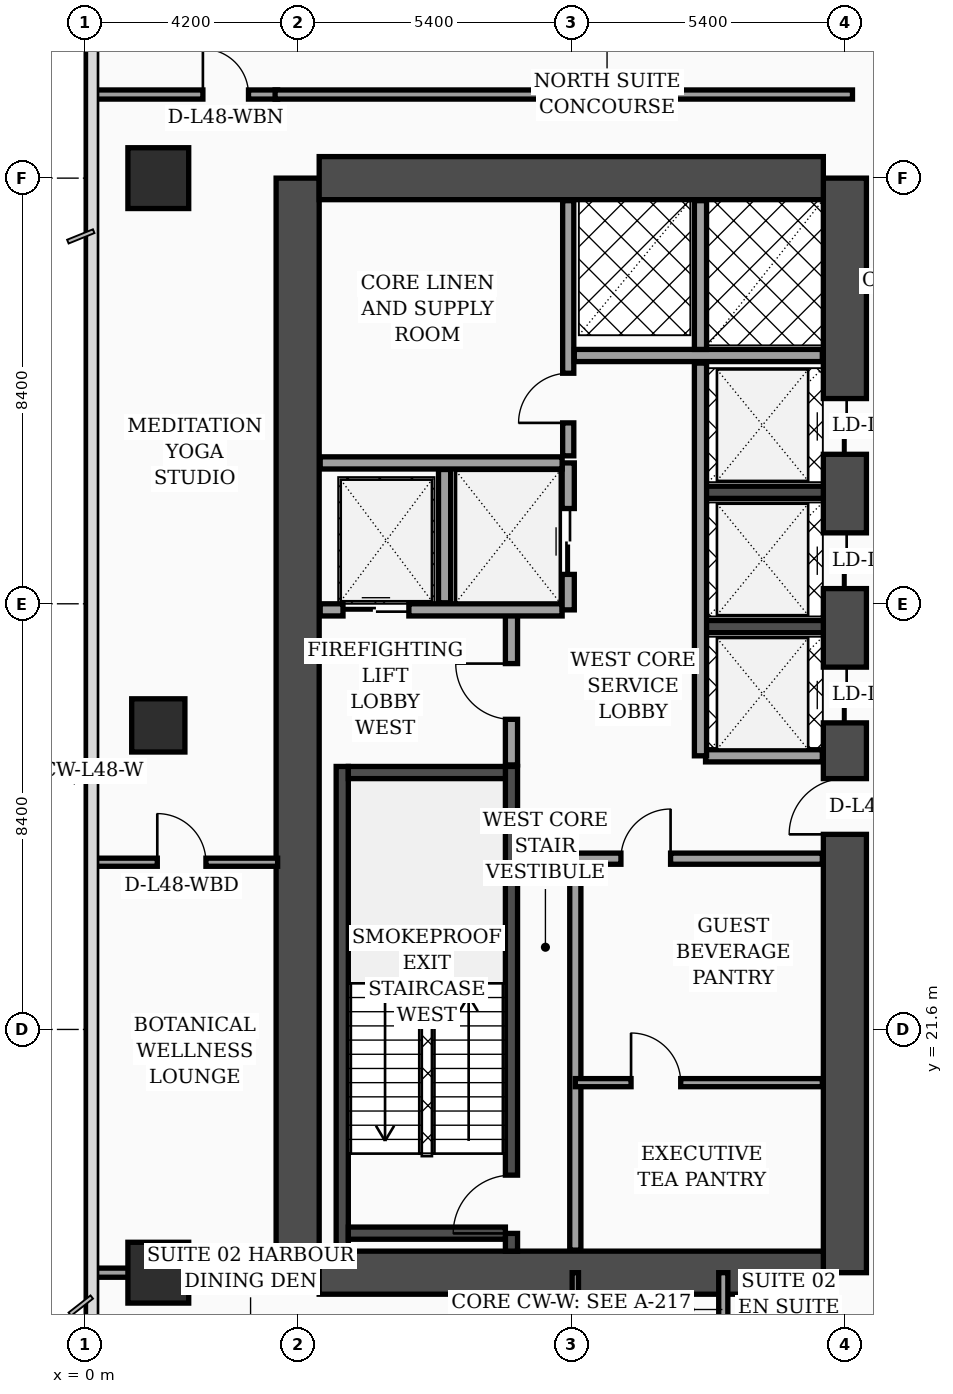
"""IFC4 building model, lengths in metres.
Left out: names, types, materials, properties, quantities, classifications, styles, units other than length and angle.
Written with IfcOpenShell. Run it as: python <this file> out.ifc"""

import sys

from ifc_helpers import new_model, si_unit, direction, frame, frame_2d, origin, origin_2d, place, context, subcontext, project, spatial, rectangle, extrude, element, fill, save


model = new_model("IFC4")
c1 = context("Model", 3, precision=1e-05, world=origin(), true_north=direction((0.0, 1.0)))
c2 = subcontext(c1, "Body", "Model", "MODEL_VIEW")
j1 = project(units=[si_unit("LENGTHUNIT", "METRE"), si_unit("PLANEANGLEUNIT", "RADIAN")], contexts=[c1])
p1 = place(None, origin())
s1 = spatial("IfcSite", under=j1, at=p1, CompositionType="ELEMENT")
p2 = place(p1, origin())
s2 = spatial("IfcBuilding", under=s1, at=p2, CompositionType="ELEMENT")
p3 = place(p2, frame((0.0, 0.0, 195.1)))
s3 = spatial("IfcBuildingStorey", under=s2, at=p3, CompositionType="ELEMENT", Elevation=195.1)
p4 = place(p3, frame((4.2, 16.8, 0.0), z_axis=(0.0, 0.0, 1.0), x_axis=(0.0, 1.0, 0.0)))
e1 = element("IfcWall", 1, at=p4, inside=s3, PredefinedType="SHEAR", context=c2, shape_type="SweptSolid", body=[
    extrude(rectangle(XDim=21.6, YDim=0.85, at=frame_2d((10.8, 0.0))), origin(), (0.0, 0.0, 1.0), 4.05),
])
p5 = place(p3, frame((15.0, 16.8, 0.0), z_axis=(0.0, 0.0, 1.0), x_axis=(0.0, 1.0, 0.0)))
e2 = element("IfcWall", 2, at=p5, inside=s3, PredefinedType="SHEAR", context=c2, shape_type="SweptSolid", body=[
    extrude(rectangle(XDim=21.6, YDim=0.85, at=frame_2d((10.8, 0.0))), origin(), (0.0, 0.0, 1.0), 4.05),
])
p6 = place(p5, frame((8.65, 0.0, 0.0)))
e3 = element("IfcOpeningElement", 3, at=p6, cuts=e2, PredefinedType="OPENING", context=c2, shape_type="SweptSolid", body=[
    extrude(rectangle(XDim=1.1, YDim=2.2, at=frame_2d((0.55, 1.1))), frame((0.0, 0.435, 0.0), z_axis=(0.0, -1.0, 0.0), x_axis=(1.0, 0.0, 0.0)), (0.0, 0.0, 1.0), 0.87),
])
p7 = place(p5, frame((10.85, 0.0, 0.0)))
e4 = element("IfcOpeningElement", 4, at=p7, cuts=e2, PredefinedType="OPENING", context=c2, shape_type="SweptSolid", body=[
    extrude(rectangle(XDim=1.1, YDim=2.2, at=frame_2d((0.55, 1.1))), frame((0.0, 0.435, 0.0), z_axis=(0.0, -1.0, 0.0), x_axis=(1.0, 0.0, 0.0)), (0.0, 0.0, 1.0), 0.87),
])
p8 = place(p5, frame((13.5, 0.0, 0.0)))
e5 = element("IfcOpeningElement", 5, at=p8, cuts=e2, PredefinedType="OPENING", context=c2, shape_type="SweptSolid", body=[
    extrude(rectangle(XDim=1.1, YDim=2.2, at=frame_2d((0.55, 1.1))), frame((0.0, 0.435, 0.0), z_axis=(0.0, -1.0, 0.0), x_axis=(1.0, 0.0, 0.0)), (0.0, 0.0, 1.0), 0.87),
])
p9 = place(p5, frame((16.15, 0.0, 0.0)))
e6 = element("IfcOpeningElement", 6, at=p9, cuts=e2, PredefinedType="OPENING", context=c2, shape_type="SweptSolid", body=[
    extrude(rectangle(XDim=1.1, YDim=2.2, at=frame_2d((0.55, 1.1))), frame((0.0, 0.435, 0.0), z_axis=(0.0, -1.0, 0.0), x_axis=(1.0, 0.0, 0.0)), (0.0, 0.0, 1.0), 0.87),
])
for number, where, z_axis, x_axis in (
    (7, (4.625, 38.4, 0.0), (0.0, 0.0, 1.0), (1.0, 0.0, 0.0)),
    (8, (4.625, 16.8, 0.0), (0.0, 0.0, 1.0), (1.0, 0.0, 0.0)),
):
    element("IfcWall", number, at=place(p3, frame(where, z_axis=z_axis, x_axis=x_axis)), inside=s3, PredefinedType="SHEAR", context=c2, shape_type="SweptSolid", body=[
        extrude(rectangle(XDim=9.95, YDim=0.85, at=frame_2d((4.975, 0.0))), origin(), (0.0, 0.0, 1.0), 4.05),
    ])
p10 = place(p3, frame((5.08, 17.225, 0.0), z_axis=(0.0, 0.0, 1.0), x_axis=(0.0, 1.0, 0.0)))
e9 = element("IfcWall", 9, at=p10, inside=s3, PredefinedType="SOLIDWALL", context=c2, shape_type="SweptSolid", body=[
    extrude(rectangle(XDim=9.565, YDim=0.24, at=frame_2d((4.782, 0.0))), origin(), (0.0, 0.0, 1.0), 4.05),
])
p11 = place(p3, frame((8.42, 17.225, 0.0), z_axis=(0.0, 0.0, 1.0), x_axis=(0.0, 1.0, 0.0)))
e10 = element("IfcWall", 10, at=p11, inside=s3, PredefinedType="SOLIDWALL", context=c2, shape_type="SweptSolid", body=[
    extrude(rectangle(XDim=9.565, YDim=0.24, at=frame_2d((4.782, 0.0))), origin(), (0.0, 0.0, 1.0), 4.05),
])
p12 = place(p11, frame((0.35, 0.0, 0.0)))
e11 = element("IfcOpeningElement", 11, at=p12, cuts=e10, PredefinedType="OPENING", context=c2, shape_type="SweptSolid", body=[
    extrude(rectangle(XDim=1.15, YDim=2.2, at=frame_2d((0.575, 1.1))), frame((0.0, 0.13, 0.0), z_axis=(0.0, -1.0, 0.0), x_axis=(1.0, 0.0, 0.0)), (0.0, 0.0, 1.0), 0.26),
])
for number, where, z_axis, x_axis in (
    (12, (5.2, 17.58, 0.0), (0.0, 0.0, 1.0), (1.0, 0.0, 0.0)),
    (13, (5.2, 26.67, 0.0), (0.0, 0.0, 1.0), (1.0, 0.0, 0.0)),
):
    element("IfcWall", number, at=place(p3, frame(where, z_axis=z_axis, x_axis=x_axis)), inside=s3, PredefinedType="SOLIDWALL", context=c2, shape_type="SweptSolid", body=[
        extrude(rectangle(XDim=3.1, YDim=0.24, at=frame_2d((1.55, 0.0))), origin(), (0.0, 0.0, 1.0), 4.05),
    ])
for number, where, z_axis, x_axis in (
    (14, (12.18, 29.55, 0.0), (0.0, 0.0, 1.0), (1.0, 0.0, 0.0)),
    (15, (12.18, 32.2, 0.0), (0.0, 0.0, 1.0), (1.0, 0.0, 0.0)),
):
    element("IfcWall", number, at=place(p3, frame(where, z_axis=z_axis, x_axis=x_axis)), inside=s3, PredefinedType="SOLIDWALL", context=c2, shape_type="SweptSolid", body=[
        extrude(rectangle(XDim=2.395, YDim=0.24, at=frame_2d((1.198, 0.0))), origin(), (0.0, 0.0, 1.0), 4.05),
    ])
p13 = place(p3, frame((1.45, 16.8, 0.0), z_axis=(0.0, 0.0, 1.0), x_axis=(1.0, 0.0, 0.0)))
e16 = element("IfcColumn", 16, at=p13, inside=s3, PredefinedType="COLUMN", context=c2, shape_type="SweptSolid", body=[
    extrude(rectangle(XDim=1.2, YDim=1.2, at=origin_2d()), origin(), (0.0, 0.0, 1.0), 4.05),
])
p14 = place(p3, frame((1.45, 27.6, 0.0), z_axis=(0.0, 0.0, 1.0), x_axis=(1.0, 0.0, 0.0)))
e17 = element("IfcColumn", 17, at=p14, inside=s3, PredefinedType="COLUMN", context=c2, shape_type="SweptSolid", body=[
    extrude(rectangle(XDim=1.05, YDim=1.05, at=origin_2d()), origin(), (0.0, 0.0, 1.0), 4.05),
])
p15 = place(p3, frame((1.45, 38.4, 0.0), z_axis=(0.0, 0.0, 1.0), x_axis=(1.0, 0.0, 0.0)))
e18 = element("IfcColumn", 18, at=p15, inside=s3, PredefinedType="COLUMN", context=c2, shape_type="SweptSolid", body=[
    extrude(rectangle(XDim=1.2, YDim=1.2, at=origin_2d()), origin(), (0.0, 0.0, 1.0), 4.05),
])
p16 = place(p3, frame((8.42, 26.82, 0.0), z_axis=(0.0, 0.0, 1.0), x_axis=(0.0, 1.0, 0.0)))
e19 = element("IfcWall", 19, at=p16, inside=s3, PredefinedType="SOLIDWALL", context=c2, shape_type="SweptSolid", body=[
    extrude(rectangle(XDim=3.0, YDim=0.24, at=frame_2d((1.5, 0.0))), origin(), (0.0, 0.0, 1.0), 4.05),
])
p17 = place(p16, frame((0.9, 0.0, 0.0)))
e20 = element("IfcOpeningElement", 20, at=p17, cuts=e19, PredefinedType="OPENING", context=c2, shape_type="SweptSolid", body=[
    extrude(rectangle(XDim=1.1, YDim=2.2, at=frame_2d((0.55, 1.1))), frame((0.0, 0.13, 0.0), z_axis=(0.0, -1.0, 0.0), x_axis=(1.0, 0.0, 0.0)), (0.0, 0.0, 1.0), 0.26),
])
p18 = place(p3, frame((4.645, 29.88, 0.0), z_axis=(0.0, 0.0, 1.0), x_axis=(1.0, 0.0, 0.0)))
e21 = element("IfcWall", 21, at=p18, inside=s3, PredefinedType="SOLIDWALL", context=c2, shape_type="SweptSolid", body=[
    extrude(rectangle(XDim=4.775, YDim=0.24, at=frame_2d((2.387, 0.0))), origin(), (0.0, 0.0, 1.0), 4.05),
])
p19 = place(p18, frame((0.45, 0.0, 0.0)))
e22 = element("IfcOpeningElement", 22, at=p19, cuts=e21, PredefinedType="OPENING", context=c2, shape_type="SweptSolid", body=[
    extrude(rectangle(XDim=1.3, YDim=2.35, at=frame_2d((0.65, 1.175))), frame((0.0, 0.13, 0.0), z_axis=(0.0, -1.0, 0.0), x_axis=(1.0, 0.0, 0.0)), (0.0, 0.0, 1.0), 0.26),
])
p20 = place(p3, frame((7.1, 30.02, 0.0), z_axis=(0.0, 0.0, 1.0), x_axis=(0.0, 1.0, 0.0)))
e23 = element("IfcWall", 23, at=p20, inside=s3, PredefinedType="SOLIDWALL", context=c2, shape_type="SweptSolid", body=[
    extrude(rectangle(XDim=2.63, YDim=0.24, at=frame_2d((1.315, 0.0))), origin(), (0.0, 0.0, 1.0), 4.05),
])
p21 = place(p3, frame((9.54, 29.88, 0.0), z_axis=(0.0, 0.0, 1.0), x_axis=(0.0, 1.0, 0.0)))
e24 = element("IfcWall", 24, at=p21, inside=s3, PredefinedType="SOLIDWALL", context=c2, shape_type="SweptSolid", body=[
    extrude(rectangle(XDim=2.9, YDim=0.24, at=frame_2d((1.45, 0.0))), origin(), (0.0, 0.0, 1.0), 4.05),
])
p22 = place(p21, frame((0.7, 0.0, 0.0)))
e25 = element("IfcOpeningElement", 25, at=p22, cuts=e24, PredefinedType="OPENING", context=c2, shape_type="SweptSolid", body=[
    extrude(rectangle(XDim=1.3, YDim=2.35, at=frame_2d((0.65, 1.175))), frame((0.0, 0.13, 0.0), z_axis=(0.0, -1.0, 0.0), x_axis=(1.0, 0.0, 0.0)), (0.0, 0.0, 1.0), 0.26),
])
p23 = place(p3, frame((4.645, 32.78, 0.0), z_axis=(0.0, 0.0, 1.0), x_axis=(1.0, 0.0, 0.0)))
e26 = element("IfcWall", 26, at=p23, inside=s3, PredefinedType="SOLIDWALL", context=c2, shape_type="SweptSolid", body=[
    extrude(rectangle(XDim=4.775, YDim=0.24, at=frame_2d((2.387, 0.0))), origin(), (0.0, 0.0, 1.0), 3.7),
])
p24 = place(p3, frame((9.68, 17.245, 0.0), z_axis=(0.0, 0.0, 1.0), x_axis=(0.0, 1.0, 0.0)))
e27 = element("IfcWall", 27, at=p24, inside=s3, PredefinedType="SOLIDWALL", context=c2, shape_type="SweptSolid", body=[
    extrude(rectangle(XDim=7.755, YDim=0.22, at=frame_2d((3.877, 0.0))), origin(), (0.0, 0.0, 1.0), 4.05),
])
p25 = place(p3, frame((9.54, 32.92, 0.0), z_axis=(0.0, 0.0, 1.0), x_axis=(0.0, 1.0, 0.0)))
e28 = element("IfcWall", 28, at=p25, inside=s3, PredefinedType="SOLIDWALL", context=c2, shape_type="SweptSolid", body=[
    extrude(rectangle(XDim=5.035, YDim=0.22, at=frame_2d((2.518, 0.0))), origin(), (0.0, 0.0, 1.0), 4.05),
])
p26 = place(p25, frame((0.65, 0.0, 0.0)))
e29 = element("IfcOpeningElement", 29, at=p26, cuts=e28, PredefinedType="OPENING", context=c2, shape_type="SweptSolid", body=[
    extrude(rectangle(XDim=0.98, YDim=2.15, at=frame_2d((0.49, 1.075))), frame((0.0, 0.12, 0.0), z_axis=(0.0, -1.0, 0.0), x_axis=(1.0, 0.0, 0.0)), (0.0, 0.0, 1.0), 0.24),
])
p27 = place(p3, frame((9.68, 20.55, 0.0), z_axis=(0.0, 0.0, 1.0), x_axis=(1.0, 0.0, 0.0)))
e30 = element("IfcWall", 30, at=p27, inside=s3, PredefinedType="PARTITIONING", context=c2, shape_type="SweptSolid", body=[
    extrude(rectangle(XDim=4.875, YDim=0.16, at=frame_2d((2.438, 0.0))), origin(), (0.0, 0.0, 1.0), 4.05),
])
p28 = place(p27, frame((1.1, 0.0, 0.0)))
e31 = element("IfcOpeningElement", 31, at=p28, cuts=e30, PredefinedType="OPENING", context=c2, shape_type="SweptSolid", body=[
    extrude(rectangle(XDim=0.98, YDim=2.15, at=frame_2d((0.49, 1.075))), frame((0.0, 0.09, 0.0), z_axis=(0.0, -1.0, 0.0), x_axis=(1.0, 0.0, 0.0)), (0.0, 0.0, 1.0), 0.18),
])
p29 = place(p3, frame((9.68, 24.97, 0.0), z_axis=(0.0, 0.0, 1.0), x_axis=(1.0, 0.0, 0.0)))
e32 = element("IfcWall", 32, at=p29, inside=s3, PredefinedType="SOLIDWALL", context=c2, shape_type="SweptSolid", body=[
    extrude(rectangle(XDim=4.875, YDim=0.22, at=frame_2d((2.438, 0.0))), origin(), (0.0, 0.0, 1.0), 3.45),
])
p30 = place(p29, frame((0.9, 0.0, 0.0)))
e33 = element("IfcOpeningElement", 33, at=p30, cuts=e32, PredefinedType="OPENING", context=c2, shape_type="SweptSolid", body=[
    extrude(rectangle(XDim=0.98, YDim=2.15, at=frame_2d((0.49, 1.075))), frame((0.0, 0.12, 0.0), z_axis=(0.0, -1.0, 0.0), x_axis=(1.0, 0.0, 0.0)), (0.0, 0.0, 1.0), 0.24),
])
p31 = place(p3, frame((12.25, 27.0, 0.0), z_axis=(0.0, 0.0, 1.0), x_axis=(1.0, 0.0, 0.0)))
e34 = element("IfcWall", 34, at=p31, inside=s3, PredefinedType="SOLIDWALL", context=c2, shape_type="SweptSolid", body=[
    extrude(rectangle(XDim=2.305, YDim=0.24, at=frame_2d((1.152, 0.0))), origin(), (0.0, 0.0, 1.0), 4.05),
])
p32 = place(p3, frame((12.15, 27.0, 0.0), z_axis=(0.0, 0.0, 1.0), x_axis=(0.0, 1.0, 0.0)))
e35 = element("IfcWall", 35, at=p32, inside=s3, PredefinedType="SOLIDWALL", context=c2, shape_type="SweptSolid", body=[
    extrude(rectangle(XDim=7.75, YDim=0.24, at=frame_2d((3.875, 0.0))), origin(), (0.0, 0.0, 1.0), 4.05),
])
p33 = place(p3, frame((9.66, 34.9, 0.0), z_axis=(0.0, 0.0, 1.0), x_axis=(1.0, 0.0, 0.0)))
e36 = element("IfcWall", 36, at=p33, inside=s3, PredefinedType="SOLIDWALL", context=c2, shape_type="SweptSolid", body=[
    extrude(rectangle(XDim=4.895, YDim=0.24, at=frame_2d((2.448, 0.0))), origin(), (0.0, 0.0, 1.0), 4.05),
])
p34 = place(p3, frame((12.15, 35.02, 0.0), z_axis=(0.0, 0.0, 1.0), x_axis=(0.0, 1.0, 0.0)))
e37 = element("IfcWall", 37, at=p34, inside=s3, PredefinedType="SOLIDWALL", context=c2, shape_type="SweptSolid", body=[
    extrude(rectangle(XDim=2.935, YDim=0.24, at=frame_2d((1.468, 0.0))), origin(), (0.0, 0.0, 1.0), 4.05),
])
p35 = place(p3, frame((0.08, 24.9, 0.0), z_axis=(0.0, 0.0, 1.0), x_axis=(1.0, 0.0, 0.0)))
e38 = element("IfcWall", 38, at=p35, inside=s3, PredefinedType="PARTITIONING", context=c2, shape_type="SweptSolid", body=[
    extrude(rectangle(XDim=3.725, YDim=0.16, at=frame_2d((1.862, 0.0))), origin(), (0.0, 0.0, 1.0), 3.6),
])
p36 = place(p35, frame((1.35, 0.0, 0.0)))
e39 = element("IfcOpeningElement", 39, at=p36, cuts=e38, PredefinedType="OPENING", context=c2, shape_type="SweptSolid", body=[
    extrude(rectangle(XDim=0.96, YDim=2.2, at=frame_2d((0.48, 1.1))), frame((0.0, 0.09, 0.0), z_axis=(0.0, -1.0, 0.0), x_axis=(1.0, 0.0, 0.0)), (0.0, 0.0, 1.0), 0.18),
])
p37 = place(p3, frame((0.08, 16.8, 0.0), z_axis=(0.0, 0.0, 1.0), x_axis=(1.0, 0.0, 0.0)))
e40 = element("IfcWall", 40, at=p37, inside=s3, PredefinedType="PARTITIONING", context=c2, shape_type="SweptSolid", body=[
    extrude(rectangle(XDim=3.725, YDim=0.18, at=frame_2d((1.862, 0.0))), origin(), (0.0, 0.0, 1.0), 3.45),
])
p38 = place(p3, frame((0.08, 40.05, 0.0), z_axis=(0.0, 0.0, 1.0), x_axis=(1.0, 0.0, 0.0)))
e41 = element("IfcWall", 41, at=p38, inside=s3, PredefinedType="PARTITIONING", context=c2, shape_type="SweptSolid", body=[
    extrude(rectangle(XDim=3.725, YDim=0.18, at=frame_2d((1.862, 0.0))), origin(), (0.0, 0.0, 1.0), 3.45),
])
p39 = place(p38, frame((2.25, 0.0, 0.0)))
e42 = element("IfcOpeningElement", 42, at=p39, cuts=e41, PredefinedType="OPENING", context=c2, shape_type="SweptSolid", body=[
    extrude(rectangle(XDim=0.9, YDim=2.15, at=frame_2d((0.45, 1.075))), frame((0.0, 0.1, 0.0), z_axis=(0.0, -1.0, 0.0), x_axis=(1.0, 0.0, 0.0)), (0.0, 0.0, 1.0), 0.2),
])
p40 = place(p3, frame((9.68, 14.71, 0.0), z_axis=(0.0, 0.0, 1.0), x_axis=(0.0, 1.0, 0.0)))
e43 = element("IfcWall", 43, at=p40, inside=s3, PredefinedType="PARTITIONING", context=c2, shape_type="SweptSolid", body=[
    extrude(rectangle(XDim=2.09, YDim=0.125, at=frame_2d((1.045, 0.0))), origin(), (0.0, 0.0, 1.0), 4.05),
])
p41 = place(p3, frame((12.6, 2.44, 0.0), z_axis=(0.0, 0.0, 1.0), x_axis=(0.0, 1.0, 0.0)))
e44 = element("IfcWall", 44, at=p41, inside=s3, PredefinedType="PARTITIONING", context=c2, shape_type="SweptSolid", body=[
    extrude(rectangle(XDim=14.36, YDim=0.18, at=frame_2d((7.18, 0.0))), origin(), (0.0, 0.0, 1.0), 2.35),
])
p42 = place(p41, frame((3.01, 0.0, 0.0)))
e45 = element("IfcOpeningElement", 45, at=p42, cuts=e44, PredefinedType="OPENING", context=c2, shape_type="SweptSolid", body=[
    extrude(rectangle(XDim=1.02, YDim=2.2, at=frame_2d((0.51, 1.1))), frame((0.0, 0.1, 0.0), z_axis=(0.0, -1.0, 0.0), x_axis=(1.0, 0.0, 0.0)), (0.0, 0.0, 1.0), 0.2),
])
p43 = place(p41, frame((9.03, 0.0, 0.0)))
e46 = element("IfcOpeningElement", 46, at=p43, cuts=e44, PredefinedType="OPENING", context=c2, shape_type="SweptSolid", body=[
    extrude(rectangle(XDim=1.02, YDim=2.2, at=frame_2d((0.51, 1.1))), frame((0.0, 0.1, 0.0), z_axis=(0.0, -1.0, 0.0), x_axis=(1.0, 0.0, 0.0)), (0.0, 0.0, 1.0), 0.2),
])
p44 = place(p3, frame((3.755, 40.05, 0.0), z_axis=(0.0, 0.0, 1.0), x_axis=(1.0, 0.0, 0.0)))
e47 = element("IfcWall", 47, at=p44, inside=s3, PredefinedType="PARTITIONING", context=c2, shape_type="SweptSolid", body=[
    extrude(rectangle(XDim=11.395, YDim=0.18, at=frame_2d((5.698, 0.0))), origin(), (0.0, 0.0, 1.0), 3.45),
])
p45 = place(p17, origin())
e48 = element("IfcDoor", 48, at=p45, inside=s3, OperationType="SINGLE_SWING_RIGHT", PredefinedType="DOOR", context=c2, shape_type="SweptSolid", body=[
    extrude(rectangle(XDim=1.1, YDim=2.2, at=frame_2d((0.55, 1.1))), frame((0.0, 0.025, 0.0), z_axis=(0.0, -1.0, 0.0), x_axis=(1.0, 0.0, 0.0)), (0.0, 0.0, 1.0), 0.05),
])
fill(e20, e48)
p46 = place(p19, origin())
e49 = element("IfcDoor", 49, at=p46, inside=s3, OperationType="DOUBLE_DOOR_SLIDING", PredefinedType="DOOR", context=c2, shape_type="SweptSolid", body=[
    extrude(rectangle(XDim=1.3, YDim=2.35, at=frame_2d((0.65, 1.175))), frame((0.0, 0.025, 0.0), z_axis=(0.0, -1.0, 0.0), x_axis=(1.0, 0.0, 0.0)), (0.0, 0.0, 1.0), 0.05),
])
fill(e22, e49)
p47 = place(p22, origin())
e50 = element("IfcDoor", 50, at=p47, inside=s3, OperationType="DOUBLE_DOOR_SLIDING", PredefinedType="DOOR", context=c2, shape_type="SweptSolid", body=[
    extrude(rectangle(XDim=1.3, YDim=2.35, at=frame_2d((0.65, 1.175))), frame((0.0, 0.025, 0.0), z_axis=(0.0, -1.0, 0.0), x_axis=(1.0, 0.0, 0.0)), (0.0, 0.0, 1.0), 0.05),
])
fill(e25, e50)
p48 = place(p26, origin())
e51 = element("IfcDoor", 51, at=p48, inside=s3, OperationType="SINGLE_SWING_LEFT", PredefinedType="DOOR", context=c2, shape_type="SweptSolid", body=[
    extrude(rectangle(XDim=0.98, YDim=2.15, at=frame_2d((0.49, 1.075))), frame((0.0, 0.025, 0.0), z_axis=(0.0, -1.0, 0.0), x_axis=(1.0, 0.0, 0.0)), (0.0, 0.0, 1.0), 0.05),
])
fill(e29, e51)
p49 = place(p28, origin())
e52 = element("IfcDoor", 52, at=p49, inside=s3, OperationType="SINGLE_SWING_LEFT", PredefinedType="DOOR", context=c2, shape_type="SweptSolid", body=[
    extrude(rectangle(XDim=0.98, YDim=2.15, at=frame_2d((0.49, 1.075))), frame((0.0, 0.025, 0.0), z_axis=(0.0, -1.0, 0.0), x_axis=(1.0, 0.0, 0.0)), (0.0, 0.0, 1.0), 0.05),
])
fill(e31, e52)
p50 = place(p30, origin())
e53 = element("IfcDoor", 53, at=p50, inside=s3, OperationType="SINGLE_SWING_RIGHT", PredefinedType="DOOR", context=c2, shape_type="SweptSolid", body=[
    extrude(rectangle(XDim=0.98, YDim=2.15, at=frame_2d((0.49, 1.075))), frame((0.0, 0.025, 0.0), z_axis=(0.0, -1.0, 0.0), x_axis=(1.0, 0.0, 0.0)), (0.0, 0.0, 1.0), 0.05),
])
fill(e33, e53)
p51 = place(p36, origin())
e54 = element("IfcDoor", 54, at=p51, inside=s3, OperationType="SINGLE_SWING_LEFT", PredefinedType="DOOR", context=c2, shape_type="SweptSolid", body=[
    extrude(rectangle(XDim=0.96, YDim=2.2, at=frame_2d((0.48, 1.1))), frame((0.0, 0.025, 0.0), z_axis=(0.0, -1.0, 0.0), x_axis=(1.0, 0.0, 0.0)), (0.0, 0.0, 1.0), 0.05),
])
fill(e39, e54)
p52 = place(p39, origin())
e55 = element("IfcDoor", 55, at=p52, inside=s3, OperationType="SINGLE_SWING_LEFT", PredefinedType="DOOR", context=c2, shape_type="SweptSolid", body=[
    extrude(rectangle(XDim=0.9, YDim=2.15, at=frame_2d((0.45, 1.075))), frame((0.0, 0.025, 0.0), z_axis=(0.0, -1.0, 0.0), x_axis=(1.0, 0.0, 0.0)), (0.0, 0.0, 1.0), 0.05),
])
fill(e42, e55)
p53 = place(p12, origin())
e56 = element("IfcDoor", 56, at=p53, inside=s3, OperationType="SINGLE_SWING_LEFT", PredefinedType="DOOR", context=c2, shape_type="SweptSolid", body=[
    extrude(rectangle(XDim=1.15, YDim=2.2, at=frame_2d((0.575, 1.1))), frame((0.0, 0.025, 0.0), z_axis=(0.0, -1.0, 0.0), x_axis=(1.0, 0.0, 0.0)), (0.0, 0.0, 1.0), 0.05),
])
fill(e11, e56)
p54 = place(p6, origin())
e57 = element("IfcDoor", 57, at=p54, inside=s3, OperationType="SINGLE_SWING_LEFT", PredefinedType="DOOR", context=c2, shape_type="SweptSolid", body=[
    extrude(rectangle(XDim=1.1, YDim=2.2, at=frame_2d((0.55, 1.1))), frame((0.0, 0.025, 0.0), z_axis=(0.0, -1.0, 0.0), x_axis=(1.0, 0.0, 0.0)), (0.0, 0.0, 1.0), 0.05),
])
fill(e3, e57)
p55 = place(p7, origin())
e58 = element("IfcDoor", 58, at=p55, inside=s3, OperationType="DOUBLE_DOOR_SLIDING", PredefinedType="DOOR", context=c2, shape_type="SweptSolid", body=[
    extrude(rectangle(XDim=1.1, YDim=2.2, at=frame_2d((0.55, 1.1))), frame((0.0, 0.025, 0.0), z_axis=(0.0, -1.0, 0.0), x_axis=(1.0, 0.0, 0.0)), (0.0, 0.0, 1.0), 0.05),
])
fill(e4, e58)
p56 = place(p8, origin())
e59 = element("IfcDoor", 59, at=p56, inside=s3, OperationType="DOUBLE_DOOR_SLIDING", PredefinedType="DOOR", context=c2, shape_type="SweptSolid", body=[
    extrude(rectangle(XDim=1.1, YDim=2.2, at=frame_2d((0.55, 1.1))), frame((0.0, 0.025, 0.0), z_axis=(0.0, -1.0, 0.0), x_axis=(1.0, 0.0, 0.0)), (0.0, 0.0, 1.0), 0.05),
])
fill(e5, e59)
p57 = place(p9, origin())
e60 = element("IfcDoor", 60, at=p57, inside=s3, OperationType="DOUBLE_DOOR_SLIDING", PredefinedType="DOOR", context=c2, shape_type="SweptSolid", body=[
    extrude(rectangle(XDim=1.1, YDim=2.2, at=frame_2d((0.55, 1.1))), frame((0.0, 0.025, 0.0), z_axis=(0.0, -1.0, 0.0), x_axis=(1.0, 0.0, 0.0)), (0.0, 0.0, 1.0), 0.05),
])
fill(e6, e60)
save(model, sys.argv[1])
